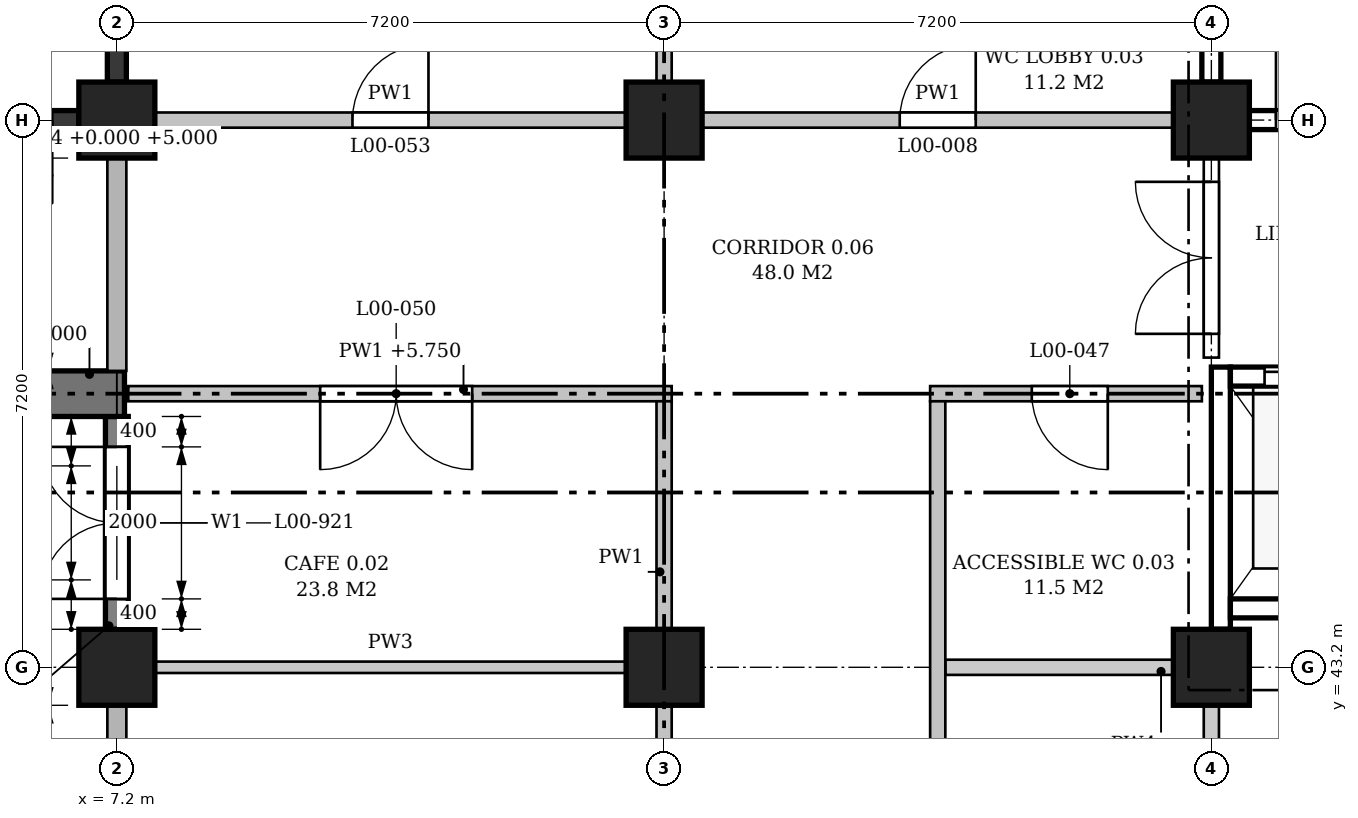
"""IFC4 building model, lengths in metres.
Left out: names, types, materials, properties, quantities, classifications, styles, units other than length and angle.
Written with IfcOpenShell. Run it as: python <this file> out.ifc"""

import sys

from ifc_helpers import new_model, si_unit, direction, frame, frame_2d, origin, origin_2d, place, context, subcontext, project, spatial, polyline, rectangle, outline, extrude, element, fill, save


model = new_model("IFC4")
c1 = context("Model", 3, precision=1e-05, world=origin(), true_north=direction((0.0, 1.0)))
c2 = subcontext(c1, "Body", "Model", "MODEL_VIEW")
j1 = project(units=[si_unit("LENGTHUNIT", "METRE"), si_unit("PLANEANGLEUNIT", "RADIAN")], contexts=[c1])
p1 = place(None, origin())
s1 = spatial("IfcSite", under=j1, at=p1, CompositionType="ELEMENT")
p2 = place(p1, origin())
s2 = spatial("IfcBuilding", under=s1, at=p2, CompositionType="ELEMENT")
p3 = place(p2, origin())
s3 = spatial("IfcBuildingStorey", under=s2, at=p3, CompositionType="ELEMENT", Elevation=0.0)
for number, where, z_axis, x_axis in (
    (1, (7.2, 43.2, 0.0), (0.0, 0.0, 1.0), (1.0, 0.0, 0.0)),
    (2, (7.2, 50.4, 0.0), (0.0, 0.0, 1.0), (1.0, 0.0, 0.0)),
    (3, (14.4, 43.2, 0.0), (0.0, 0.0, 1.0), (1.0, 0.0, 0.0)),
    (4, (14.4, 50.4, 0.0), (0.0, 0.0, 1.0), (1.0, 0.0, 0.0)),
    (5, (21.6, 43.2, 0.0), (0.0, 0.0, 1.0), (1.0, 0.0, 0.0)),
    (6, (21.6, 50.4, 0.0), (0.0, 0.0, 1.0), (1.0, 0.0, 0.0)),
):
    element("IfcColumn", number, at=place(p3, frame(where, z_axis=z_axis, x_axis=x_axis)), inside=s3, PredefinedType="COLUMN", context=c2, shape_type="SweptSolid", body=[
        extrude(rectangle(XDim=1.0, YDim=1.0, at=origin_2d()), origin(), (0.0, 0.0, 1.0), 6.0),
    ])
p4 = place(p3, frame((7.2, 43.7, 0.0), z_axis=(0.0, 0.0, 1.0), x_axis=(0.0, 1.0, 0.0)))
e7 = element("IfcWall", 7, at=p4, inside=s3, PredefinedType="STANDARD", context=c2, shape_type="SweptSolid", body=[
    extrude(rectangle(XDim=2.8, YDim=0.3, at=frame_2d((1.4, 0.0))), origin(), (0.0, 0.0, 1.0), 5.0),
])
p5 = place(p4, frame((0.4, 0.0, 0.0)))
e8 = element("IfcOpeningElement", 8, at=p5, cuts=e7, PredefinedType="OPENING", context=c2, shape_type="SweptSolid", body=[
    extrude(outline(polyline([(0.0, 0.0), (2.0, 0.0), (2.0, 1.9), (1.0, 2.9), (0.0, 1.9), (0.0, 0.0)])), frame((0.0, 0.16, 0.0), z_axis=(0.0, -1.0, 0.0), x_axis=(1.0, 0.0, 0.0)), (0.0, 0.0, 1.0), 0.32),
])
p6 = place(p4, frame((0.65, 0.0, 3.15)))
e9 = element("IfcOpeningElement", 9, at=p6, cuts=e7, PredefinedType="OPENING", context=c2, shape_type="SweptSolid", body=[
    extrude(outline(polyline([(0.0, 0.0), (1.5, 0.0), (1.5, 1.05), (0.75, 1.8), (0.0, 1.05), (0.0, 0.0)])), frame((0.0, 0.16, 0.0), z_axis=(0.0, -1.0, 0.0), x_axis=(1.0, 0.0, 0.0)), (0.0, 0.0, 1.0), 0.32),
])
p7 = place(p3, frame((7.3, 46.8, 0.0), z_axis=(0.0, 0.0, 1.0), x_axis=(-1.0, 0.0, 0.0)))
e10 = element("IfcWall", 10, at=p7, inside=s3, PredefinedType="POLYGONAL", context=c2, shape_type="SweptSolid", body=[
    extrude(outline(polyline([(1.0, 0.0), (1.0, 5.25), (0.5, 6.0), (0.35, 6.0), (0.35, 5.0), (0.0, 5.0), (0.0, 0.0), (1.0, 0.0)])), frame((0.0, 0.3, 0.0), z_axis=(0.0, -1.0, 0.0), x_axis=(1.0, 0.0, 0.0)), (0.0, 0.0, 1.0), 0.6),
])
p8 = place(p3, frame((0.6, 50.4, 0.0), z_axis=(0.0, 0.0, 1.0), x_axis=(1.0, 0.0, 0.0)))
e11 = element("IfcWall", 11, at=p8, inside=s3, PredefinedType="SHEAR", context=c2, shape_type="SweptSolid", body=[
    extrude(rectangle(XDim=6.1, YDim=0.25, at=frame_2d((3.05, 0.0))), origin(), (0.0, 0.0, 1.0), 5.0),
])
p9 = place(p8, frame((4.65, 0.0, 0.0)))
e12 = element("IfcOpeningElement", 12, at=p9, cuts=e11, PredefinedType="OPENING", context=c2, shape_type="SweptSolid", body=[
    extrude(rectangle(XDim=1.1, YDim=2.1, at=frame_2d((0.55, 1.05))), frame((0.0, 0.135, 0.0), z_axis=(0.0, -1.0, 0.0), x_axis=(1.0, 0.0, 0.0)), (0.0, 0.0, 1.0), 0.27),
])
p10 = place(p3, frame((7.2, 50.9, 0.0), z_axis=(0.0, 0.0, 1.0), x_axis=(0.0, 1.0, 0.0)))
e13 = element("IfcWall", 13, at=p10, inside=s3, PredefinedType="SHEAR", context=c2, shape_type="SweptSolid", body=[
    extrude(rectangle(XDim=6.2, YDim=0.25, at=frame_2d((3.1, 0.0))), origin(), (0.0, 0.0, 1.0), 5.0),
])
p11 = place(p3, frame((22.1, 50.4, 0.0), z_axis=(0.0, 0.0, 1.0), x_axis=(1.0, 0.0, 0.0)))
e14 = element("IfcWall", 14, at=p11, inside=s3, PredefinedType="SHEAR", context=c2, shape_type="SweptSolid", body=[
    extrude(rectangle(XDim=6.2, YDim=0.25, at=frame_2d((3.1, 0.0))), origin(), (0.0, 0.0, 1.0), 5.0),
])
p12 = place(p11, frame((0.35, 0.0, 0.0)))
e15 = element("IfcOpeningElement", 15, at=p12, cuts=e14, PredefinedType="OPENING", context=c2, shape_type="SweptSolid", body=[
    extrude(rectangle(XDim=1.1, YDim=2.1, at=frame_2d((0.55, 1.05))), frame((0.0, 0.135, 0.0), z_axis=(0.0, -1.0, 0.0), x_axis=(1.0, 0.0, 0.0)), (0.0, 0.0, 1.0), 0.27),
])
p13 = place(p3, frame((21.6, 50.9, 0.0), z_axis=(0.0, 0.0, 1.0), x_axis=(0.0, 1.0, 0.0)))
e16 = element("IfcWall", 16, at=p13, inside=s3, PredefinedType="SHEAR", context=c2, shape_type="SweptSolid", body=[
    extrude(rectangle(XDim=6.2, YDim=0.25, at=frame_2d((3.1, 0.0))), origin(), (0.0, 0.0, 1.0), 5.0),
])
p14 = place(p3, frame((21.725, 43.7, -0.3), z_axis=(0.0, 0.0, 1.0), x_axis=(0.0, 1.0, 0.0)))
e17 = element("IfcWall", 17, at=p14, inside=s3, PredefinedType="SHEAR", context=c2, shape_type="SweptSolid", body=[
    extrude(rectangle(XDim=3.45, YDim=0.25, at=frame_2d((1.725, 0.0))), origin(), (0.0, 0.0, 1.0), 5.3),
])
p15 = place(p3, frame((21.85, 47.025, -0.3), z_axis=(0.0, 0.0, 1.0), x_axis=(1.0, 0.0, 0.0)))
e18 = element("IfcWall", 18, at=p15, inside=s3, PredefinedType="SHEAR", context=c2, shape_type="SweptSolid", body=[
    extrude(rectangle(XDim=2.0, YDim=0.25, at=frame_2d((1.0, 0.0))), origin(), (0.0, 0.0, 1.0), 6.05),
])
p16 = place(p15, frame((0.45, 0.0, 0.3)))
e19 = element("IfcOpeningElement", 19, at=p16, cuts=e18, PredefinedType="OPENING", context=c2, shape_type="SweptSolid", body=[
    extrude(rectangle(XDim=1.1, YDim=2.1, at=frame_2d((0.55, 1.05))), frame((0.0, 0.135, 0.0), z_axis=(0.0, -1.0, 0.0), x_axis=(1.0, 0.0, 0.0)), (0.0, 0.0, 1.0), 0.27),
])
p17 = place(p3, frame((21.85, 43.975, -0.3), z_axis=(0.0, 0.0, 1.0), x_axis=(1.0, 0.0, 0.0)))
e20 = element("IfcWall", 20, at=p17, inside=s3, PredefinedType="SHEAR", context=c2, shape_type="SweptSolid", body=[
    extrude(rectangle(XDim=2.0, YDim=0.25, at=frame_2d((1.0, 0.0))), origin(), (0.0, 0.0, 1.0), 6.05),
])
p18 = place(p3, frame((7.7, 43.2, 0.0), z_axis=(0.0, 0.0, 1.0), x_axis=(1.0, 0.0, 0.0)))
e21 = element("IfcWall", 21, at=p18, inside=s3, PredefinedType="PARTITIONING", context=c2, shape_type="SweptSolid", body=[
    extrude(rectangle(XDim=6.2, YDim=0.15, at=frame_2d((3.1, 0.0))), origin(), (0.0, 0.0, 1.0), 5.0),
])
p19 = place(p3, frame((18.1, 43.2, 0.0), z_axis=(0.0, 0.0, 1.0), x_axis=(1.0, 0.0, 0.0)))
e22 = element("IfcWall", 22, at=p19, inside=s3, PredefinedType="PARTITIONING", context=c2, shape_type="SweptSolid", body=[
    extrude(rectangle(XDim=3.0, YDim=0.2, at=frame_2d((1.5, 0.0))), origin(), (0.0, 0.0, 1.0), 5.0),
])
p20 = place(p3, frame((7.35, 46.8, 0.0), z_axis=(0.0, 0.0, 1.0), x_axis=(1.0, 0.0, 0.0)))
e23 = element("IfcWall", 23, at=p20, inside=s3, PredefinedType="PARTITIONING", context=c2, shape_type="SweptSolid", body=[
    extrude(outline(polyline([(0.0, 0.0), (7.15, 0.0), (7.15, 5.0), (6.8, 5.0), (6.8, 5.75), (0.1, 5.75), (0.1, 5.0), (0.0, 5.0), (0.0, 0.0)])), frame((0.0, 0.1, 0.0), z_axis=(0.0, -1.0, 0.0), x_axis=(1.0, 0.0, 0.0)), (0.0, 0.0, 1.0), 0.2),
])
p21 = place(p20, frame((2.525, 0.0, 0.0)))
e24 = element("IfcOpeningElement", 24, at=p21, cuts=e23, PredefinedType="OPENING", context=c2, shape_type="SweptSolid", body=[
    extrude(rectangle(XDim=2.0, YDim=2.1, at=frame_2d((1.0, 1.05))), frame((0.0, 0.11, 0.0), z_axis=(0.0, -1.0, 0.0), x_axis=(1.0, 0.0, 0.0)), (0.0, 0.0, 1.0), 0.22),
])
p22 = place(p3, frame((17.9, 46.8, 0.0), z_axis=(0.0, 0.0, 1.0), x_axis=(1.0, 0.0, 0.0)))
e25 = element("IfcWall", 25, at=p22, inside=s3, PredefinedType="PARTITIONING", context=c2, shape_type="SweptSolid", body=[
    extrude(outline(polyline([(0.0, 0.0), (3.575, 0.0), (3.575, 5.0), (3.45, 5.0), (3.45, 5.75), (0.0, 5.75), (0.0, 0.0)])), frame((0.0, 0.1, 0.0), z_axis=(0.0, -1.0, 0.0), x_axis=(1.0, 0.0, 0.0)), (0.0, 0.0, 1.0), 0.2),
])
p23 = place(p22, frame((1.338, 0.0, 0.0)))
e26 = element("IfcOpeningElement", 26, at=p23, cuts=e25, PredefinedType="OPENING", context=c2, shape_type="SweptSolid", body=[
    extrude(rectangle(XDim=1.0, YDim=2.1, at=frame_2d((0.5, 1.05))), frame((0.0, 0.11, 0.0), z_axis=(0.0, -1.0, 0.0), x_axis=(1.0, 0.0, 0.0)), (0.0, 0.0, 1.0), 0.22),
])
p24 = place(p3, frame((7.7, 50.4, 0.0), z_axis=(0.0, 0.0, 1.0), x_axis=(1.0, 0.0, 0.0)))
e27 = element("IfcWall", 27, at=p24, inside=s3, PredefinedType="PARTITIONING", context=c2, shape_type="SweptSolid", body=[
    extrude(rectangle(XDim=6.2, YDim=0.2, at=frame_2d((3.1, 0.0))), origin(), (0.0, 0.0, 1.0), 5.0),
])
p25 = place(p24, frame((2.6, 0.0, 0.0)))
e28 = element("IfcOpeningElement", 28, at=p25, cuts=e27, PredefinedType="OPENING", context=c2, shape_type="SweptSolid", body=[
    extrude(rectangle(XDim=1.0, YDim=2.1, at=frame_2d((0.5, 1.05))), frame((0.0, 0.11, 0.0), z_axis=(0.0, -1.0, 0.0), x_axis=(1.0, 0.0, 0.0)), (0.0, 0.0, 1.0), 0.22),
])
p26 = place(p3, frame((14.9, 50.4, 0.0), z_axis=(0.0, 0.0, 1.0), x_axis=(1.0, 0.0, 0.0)))
e29 = element("IfcWall", 29, at=p26, inside=s3, PredefinedType="PARTITIONING", context=c2, shape_type="SweptSolid", body=[
    extrude(rectangle(XDim=6.2, YDim=0.2, at=frame_2d((3.1, 0.0))), origin(), (0.0, 0.0, 1.0), 5.0),
])
p27 = place(p26, frame((2.6, 0.0, 0.0)))
e30 = element("IfcOpeningElement", 30, at=p27, cuts=e29, PredefinedType="OPENING", context=c2, shape_type="SweptSolid", body=[
    extrude(rectangle(XDim=1.0, YDim=2.1, at=frame_2d((0.5, 1.05))), frame((0.0, 0.11, 0.0), z_axis=(0.0, -1.0, 0.0), x_axis=(1.0, 0.0, 0.0)), (0.0, 0.0, 1.0), 0.22),
])
p28 = place(p3, frame((14.4, 36.5, 0.0), z_axis=(0.0, 0.0, 1.0), x_axis=(0.0, 1.0, 0.0)))
e31 = element("IfcWall", 31, at=p28, inside=s3, PredefinedType="PARTITIONING", context=c2, shape_type="SweptSolid", body=[
    extrude(rectangle(XDim=6.2, YDim=0.2, at=frame_2d((3.1, 0.0))), origin(), (0.0, 0.0, 1.0), 5.0),
])
p29 = place(p28, frame((0.55, 0.0, 0.0)))
e32 = element("IfcOpeningElement", 32, at=p29, cuts=e31, PredefinedType="OPENING", context=c2, shape_type="SweptSolid", body=[
    extrude(rectangle(XDim=2.0, YDim=2.1, at=frame_2d((1.0, 1.05))), frame((0.0, 0.11, 0.0), z_axis=(0.0, -1.0, 0.0), x_axis=(1.0, 0.0, 0.0)), (0.0, 0.0, 1.0), 0.22),
])
p30 = place(p28, frame((3.65, 0.0, 0.0)))
e33 = element("IfcOpeningElement", 33, at=p30, cuts=e31, PredefinedType="OPENING", context=c2, shape_type="SweptSolid", body=[
    extrude(rectangle(XDim=2.0, YDim=2.1, at=frame_2d((1.0, 1.05))), frame((0.0, 0.11, 0.0), z_axis=(0.0, -1.0, 0.0), x_axis=(1.0, 0.0, 0.0)), (0.0, 0.0, 1.0), 0.22),
])
p31 = place(p3, frame((14.4, 43.7, 0.0), z_axis=(0.0, 0.0, 1.0), x_axis=(0.0, 1.0, 0.0)))
e34 = element("IfcWall", 34, at=p31, inside=s3, PredefinedType="PARTITIONING", context=c2, shape_type="SweptSolid", body=[
    extrude(rectangle(XDim=3.0, YDim=0.2, at=frame_2d((1.5, 0.0))), origin(), (0.0, 0.0, 1.0), 5.0),
])
p32 = place(p3, frame((14.4, 50.9, 0.0), z_axis=(0.0, 0.0, 1.0), x_axis=(0.0, 1.0, 0.0)))
e35 = element("IfcWall", 35, at=p32, inside=s3, PredefinedType="PARTITIONING", context=c2, shape_type="SweptSolid", body=[
    extrude(rectangle(XDim=1.3, YDim=0.2, at=frame_2d((0.65, 0.0))), origin(), (0.0, 0.0, 1.0), 5.0),
])
p33 = place(p3, frame((18.0, 36.1, 0.0), z_axis=(0.0, 0.0, 1.0), x_axis=(0.0, 1.0, 0.0)))
e36 = element("IfcWall", 36, at=p33, inside=s3, PredefinedType="PARTITIONING", context=c2, shape_type="SweptSolid", body=[
    extrude(outline(polyline([(0.0, 0.0), (10.6, 0.0), (10.6, 5.75), (7.35, 5.75), (7.35, 5.0), (6.85, 5.0), (6.85, 5.75), (0.15, 5.75), (0.15, 5.15), (0.0, 5.15), (0.0, 0.0)])), frame((0.0, 0.1, 0.0), z_axis=(0.0, -1.0, 0.0), x_axis=(1.0, 0.0, 0.0)), (0.0, 0.0, 1.0), 0.2),
])
p34 = place(p33, frame((4.8, 0.0, 0.0)))
e37 = element("IfcOpeningElement", 37, at=p34, cuts=e36, PredefinedType="OPENING", context=c2, shape_type="SweptSolid", body=[
    extrude(rectangle(XDim=1.0, YDim=2.1, at=frame_2d((0.5, 1.05))), frame((0.0, 0.11, 0.0), z_axis=(0.0, -1.0, 0.0), x_axis=(1.0, 0.0, 0.0)), (0.0, 0.0, 1.0), 0.22),
])
p35 = place(p33, frame((1.25, 0.0, 0.0)))
e38 = element("IfcOpeningElement", 38, at=p35, cuts=e36, PredefinedType="OPENING", context=c2, shape_type="SweptSolid", body=[
    extrude(rectangle(XDim=1.0, YDim=2.1, at=frame_2d((0.5, 1.05))), frame((0.0, 0.11, 0.0), z_axis=(0.0, -1.0, 0.0), x_axis=(1.0, 0.0, 0.0)), (0.0, 0.0, 1.0), 0.22),
])
p36 = place(p3, frame((21.6, 39.6, 0.0), z_axis=(0.0, 0.0, 1.0), x_axis=(0.0, 1.0, 0.0)))
e39 = element("IfcWall", 39, at=p36, inside=s3, PredefinedType="PARTITIONING", context=c2, shape_type="SweptSolid", body=[
    extrude(rectangle(XDim=3.1, YDim=0.2, at=frame_2d((1.55, 0.0))), origin(), (0.0, 0.0, 1.0), 5.0),
])
p37 = place(p3, frame((21.6, 47.275, 0.0), z_axis=(0.0, 0.0, 1.0), x_axis=(0.0, 1.0, 0.0)))
e40 = element("IfcWall", 40, at=p37, inside=s3, PredefinedType="PARTITIONING", context=c2, shape_type="SweptSolid", body=[
    extrude(rectangle(XDim=2.625, YDim=0.2, at=frame_2d((1.312, 0.0))), origin(), (0.0, 0.0, 1.0), 5.0),
])
p38 = place(p37, frame((0.312, 0.0, 0.0)))
e41 = element("IfcOpeningElement", 41, at=p38, cuts=e40, PredefinedType="OPENING", context=c2, shape_type="SweptSolid", body=[
    extrude(rectangle(XDim=2.0, YDim=2.4, at=frame_2d((1.0, 1.2))), frame((0.0, 0.11, 0.0), z_axis=(0.0, -1.0, 0.0), x_axis=(1.0, 0.0, 0.0)), (0.0, 0.0, 1.0), 0.22),
])
p39 = place(p5, origin())
e42 = element("IfcDoor", 42, at=p39, inside=s3, OperationType="DOUBLE_DOOR_SINGLE_SWING", PredefinedType="DOOR", context=c2, shape_type="SweptSolid", body=[
    extrude(outline(polyline([(0.0, 0.0), (2.0, 0.0), (2.0, 1.9), (1.0, 2.9), (0.0, 1.9), (0.0, 0.0)])), frame((0.0, 0.025, 0.0), z_axis=(0.0, -1.0, 0.0), x_axis=(1.0, 0.0, 0.0)), (0.0, 0.0, 1.0), 0.05),
])
fill(e8, e42)
p40 = place(p6, origin())
e43 = element("IfcWindow", 43, at=p40, inside=s3, PartitioningType="SINGLE_PANEL", PredefinedType="WINDOW", context=c2, shape_type="SweptSolid", body=[
    extrude(outline(polyline([(0.0, 0.0), (1.5, 0.0), (1.5, 1.05), (0.75, 1.8), (0.0, 1.05), (0.0, 0.0)])), frame((0.0, 0.03, 0.0), z_axis=(0.0, -1.0, 0.0), x_axis=(1.0, 0.0, 0.0)), (0.0, 0.0, 1.0), 0.06),
])
fill(e9, e43)
p41 = place(p12, origin())
e44 = element("IfcDoor", 44, at=p41, inside=s3, OperationType="SINGLE_SWING_LEFT", PredefinedType="DOOR", context=c2, shape_type="SweptSolid", body=[
    extrude(rectangle(XDim=1.1, YDim=2.1, at=frame_2d((0.55, 1.05))), frame((0.0, 0.025, 0.0), z_axis=(0.0, -1.0, 0.0), x_axis=(1.0, 0.0, 0.0)), (0.0, 0.0, 1.0), 0.05),
])
fill(e15, e44)
p42 = place(p16, origin())
e45 = element("IfcDoor", 45, at=p42, inside=s3, OperationType="SLIDING_TO_LEFT", PredefinedType="DOOR", context=c2, shape_type="SweptSolid", body=[
    extrude(rectangle(XDim=1.1, YDim=2.1, at=frame_2d((0.55, 1.05))), frame((0.0, 0.025, 0.0), z_axis=(0.0, -1.0, 0.0), x_axis=(1.0, 0.0, 0.0)), (0.0, 0.0, 1.0), 0.05),
])
fill(e19, e45)
p43 = place(p38, origin())
e46 = element("IfcDoor", 46, at=p43, inside=s3, OperationType="DOUBLE_DOOR_SINGLE_SWING", PredefinedType="DOOR", context=c2, shape_type="SweptSolid", body=[
    extrude(rectangle(XDim=2.0, YDim=2.4, at=frame_2d((1.0, 1.2))), frame((0.0, 0.025, 0.0), z_axis=(0.0, -1.0, 0.0), x_axis=(1.0, 0.0, 0.0)), (0.0, 0.0, 1.0), 0.05),
])
fill(e41, e46)
p44 = place(p27, origin())
e47 = element("IfcDoor", 47, at=p44, inside=s3, OperationType="SINGLE_SWING_RIGHT", PredefinedType="DOOR", context=c2, shape_type="SweptSolid", body=[
    extrude(rectangle(XDim=1.0, YDim=2.1, at=frame_2d((0.5, 1.05))), frame((0.0, 0.025, 0.0), z_axis=(0.0, -1.0, 0.0), x_axis=(1.0, 0.0, 0.0)), (0.0, 0.0, 1.0), 0.05),
])
fill(e30, e47)
p45 = place(p23, frame((1.0, 0.0, 0.0), z_axis=(0.0, 0.0, 1.0), x_axis=(-1.0, 0.0, 0.0)))
e48 = element("IfcDoor", 48, at=p45, inside=s3, OperationType="SINGLE_SWING_LEFT", PredefinedType="DOOR", context=c2, shape_type="SweptSolid", body=[
    extrude(rectangle(XDim=1.0, YDim=2.1, at=frame_2d((0.5, 1.05))), frame((0.0, 0.025, 0.0), z_axis=(0.0, -1.0, 0.0), x_axis=(1.0, 0.0, 0.0)), (0.0, 0.0, 1.0), 0.05),
])
fill(e26, e48)
p46 = place(p21, origin())
e49 = element("IfcDoor", 49, at=p46, inside=s3, OperationType="DOUBLE_DOOR_SINGLE_SWING", PredefinedType="DOOR", context=c2, shape_type="SweptSolid", body=[
    extrude(rectangle(XDim=2.0, YDim=2.1, at=frame_2d((1.0, 1.05))), frame((0.0, 0.025, 0.0), z_axis=(0.0, -1.0, 0.0), x_axis=(1.0, 0.0, 0.0)), (0.0, 0.0, 1.0), 0.05),
])
fill(e24, e49)
p47 = place(p25, origin())
e50 = element("IfcDoor", 50, at=p47, inside=s3, OperationType="SINGLE_SWING_RIGHT", PredefinedType="DOOR", context=c2, shape_type="SweptSolid", body=[
    extrude(rectangle(XDim=1.0, YDim=2.1, at=frame_2d((0.5, 1.05))), frame((0.0, 0.025, 0.0), z_axis=(0.0, -1.0, 0.0), x_axis=(1.0, 0.0, 0.0)), (0.0, 0.0, 1.0), 0.05),
])
fill(e28, e50)
save(model, sys.argv[1])
